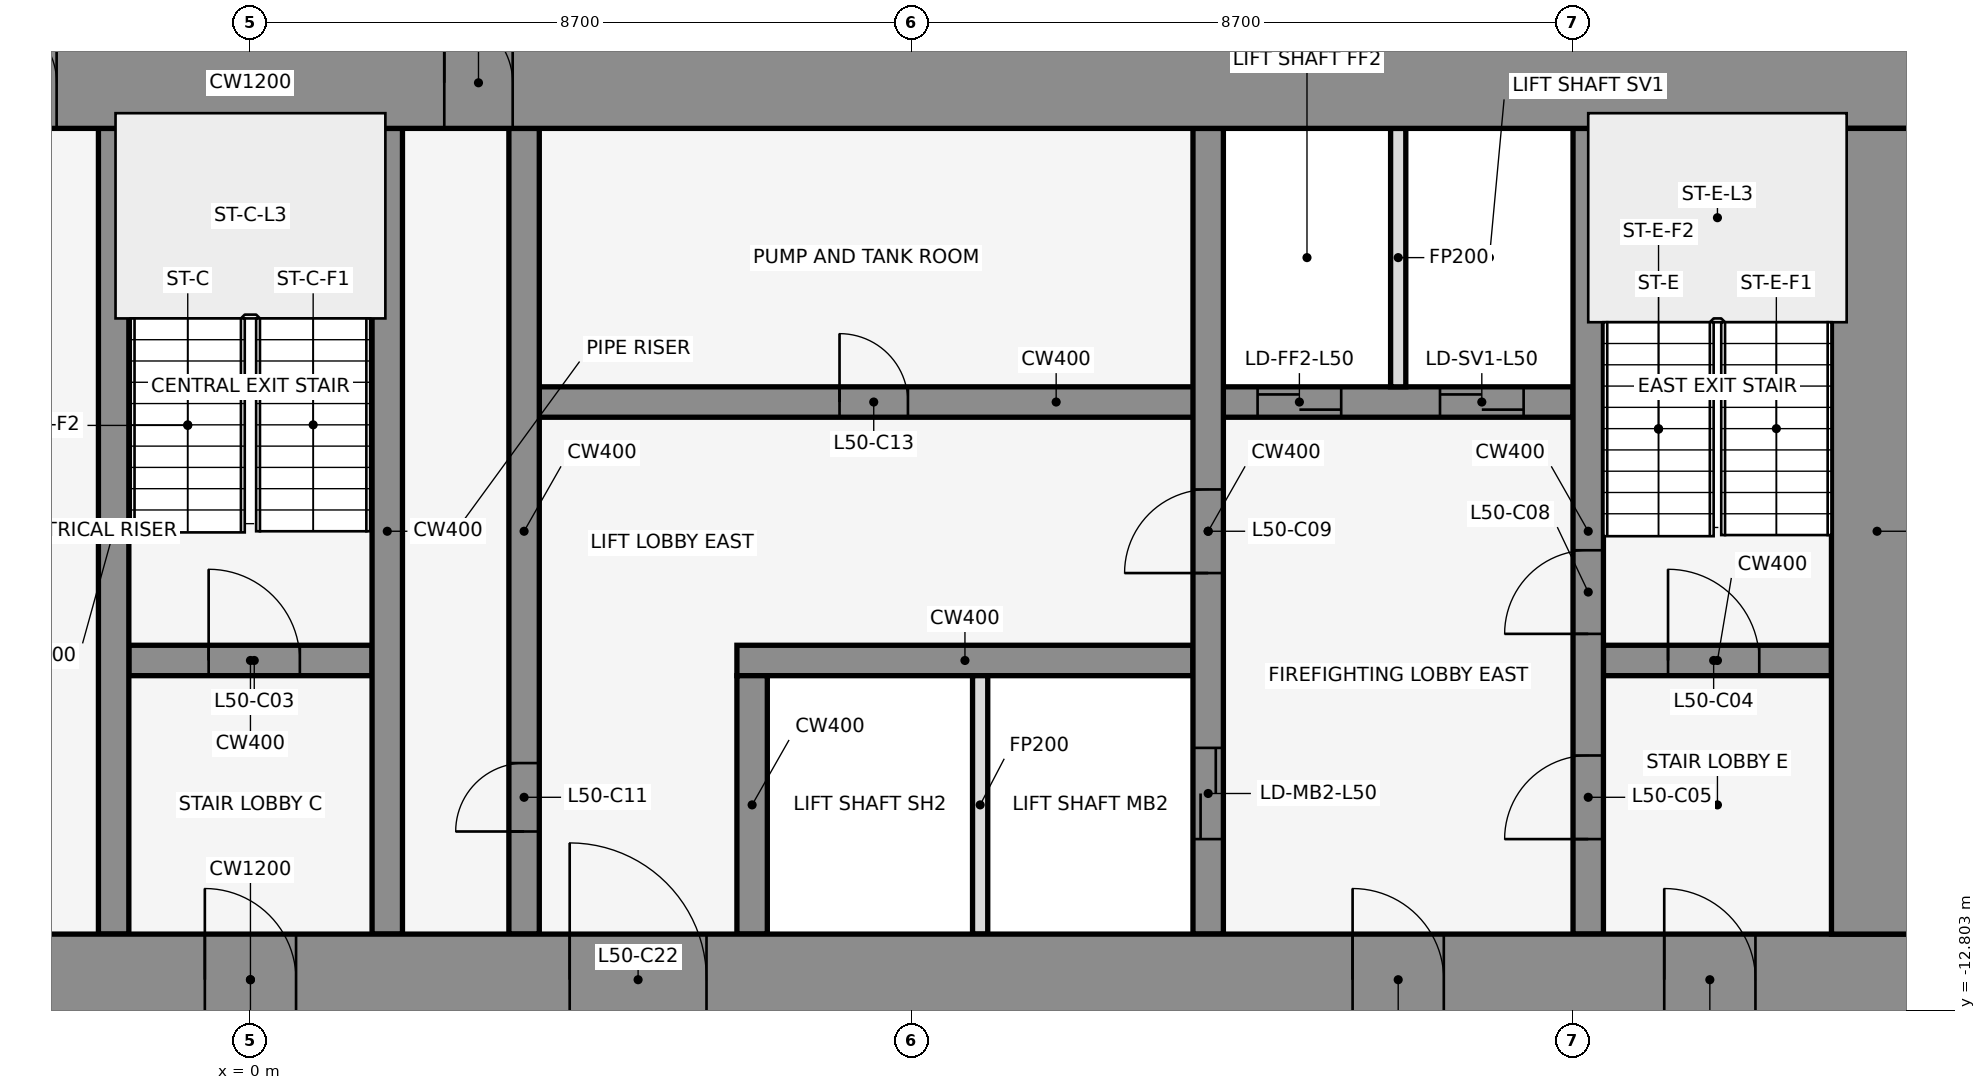
"""IFC4 building model, lengths in metres.
Left out: names, types, materials, properties, quantities, classifications, styles, units other than length and angle.
Written with IfcOpenShell. Run it as: python <this file> out.ifc"""

import sys

from ifc_helpers import new_model, si_unit, direction, frame, frame_2d, origin, place, context, subcontext, project, spatial, rectangle, extrude, element, fill, save


model = new_model("IFC4")
c1 = context("Model", 3, precision=1e-05, world=origin(), true_north=direction((0.0, 1.0)))
c2 = subcontext(c1, "Body", "Model", "MODEL_VIEW")
j1 = project(units=[si_unit("LENGTHUNIT", "METRE"), si_unit("PLANEANGLEUNIT", "RADIAN")], contexts=[c1])
p1 = place(None, origin())
s1 = spatial("IfcSite", under=j1, at=p1, CompositionType="ELEMENT")
p2 = place(p1, origin())
s2 = spatial("IfcBuilding", under=s1, at=p2, CompositionType="ELEMENT")
p3 = place(p2, frame((0.0, 0.0, 223.7)))
s3 = spatial("IfcBuildingStorey", under=s2, at=p3, CompositionType="ELEMENT", Elevation=223.7)
for number, where, z_axis, x_axis in (
    (1, (16.432, -0.105, 0.0), (0.0, 0.0, 1.0), (-0.84, 0.543, 0.0)),
    (2, (1.901, 1.08, 0.0), (0.0, 0.0, 1.0), (-0.84, -0.543, 0.0)),
    (3, (-0.068, -0.105, 0.0), (0.0, 0.0, 1.0), (-0.84, 0.543, 0.0)),
):
    element("IfcWall", number, at=place(p3, frame(where, z_axis=z_axis, x_axis=x_axis)), inside=s3, PredefinedType="STANDARD", context=c2, shape_type="SweptSolid", body=[
        extrude(rectangle(XDim=2.183, YDim=0.25, at=frame_2d((1.091, 0.0))), origin(), (0.0, 0.0, 1.0), 3.95),
    ])
p4 = place(p3, frame((-1.6, -8.2, 0.0), z_axis=(0.0, 0.0, 1.0), x_axis=(1.0, 0.0, 0.0)))
e4 = element("IfcWall", 4, at=p4, inside=s3, PredefinedType="SHEAR", context=c2, shape_type="SweptSolid", body=[
    extrude(rectangle(XDim=3.2, YDim=0.4, at=frame_2d((1.6, 0.0))), origin(), (0.0, 0.0, 1.0), 4.1),
])
p5 = place(p4, frame((1.05, 0.0, 0.0)))
e5 = element("IfcOpeningElement", 5, at=p5, cuts=e4, PredefinedType="OPENING", context=c2, shape_type="SweptSolid", body=[
    extrude(rectangle(XDim=1.2, YDim=2.1, at=frame_2d((0.6, 1.05))), frame((0.0, 0.212, 0.0), z_axis=(0.0, -1.0, 0.0), x_axis=(1.0, 0.0, 0.0)), (0.0, 0.0, 1.0), 0.424),
])
p6 = place(p3, frame((6.4, -8.2, 0.0), z_axis=(0.0, 0.0, 1.0), x_axis=(1.0, 0.0, 0.0)))
e6 = element("IfcWall", 6, at=p6, inside=s3, PredefinedType="SHEAR", context=c2, shape_type="SweptSolid", body=[
    extrude(rectangle(XDim=6.0, YDim=0.4, at=frame_2d((3.0, 0.0))), origin(), (0.0, 0.0, 1.0), 4.1),
])
p7 = place(p3, frame((17.8, -8.2, 0.0), z_axis=(0.0, 0.0, 1.0), x_axis=(1.0, 0.0, 0.0)))
e7 = element("IfcWall", 7, at=p7, inside=s3, PredefinedType="SHEAR", context=c2, shape_type="SweptSolid", body=[
    extrude(rectangle(XDim=3.0, YDim=0.4, at=frame_2d((1.5, 0.0))), origin(), (0.0, 0.0, 1.0), 4.1),
])
p8 = place(p7, frame((0.85, 0.0, 0.0)))
e8 = element("IfcOpeningElement", 8, at=p8, cuts=e7, PredefinedType="OPENING", context=c2, shape_type="SweptSolid", body=[
    extrude(rectangle(XDim=1.2, YDim=2.1, at=frame_2d((0.6, 1.05))), frame((0.0, 0.212, 0.0), z_axis=(0.0, -1.0, 0.0), x_axis=(1.0, 0.0, 0.0)), (0.0, 0.0, 1.0), 0.424),
])
p9 = place(p3, frame((3.8, -4.8, 0.0), z_axis=(0.0, 0.0, 1.0), x_axis=(1.0, 0.0, 0.0)))
e9 = element("IfcWall", 9, at=p9, inside=s3, PredefinedType="SHEAR", context=c2, shape_type="SweptSolid", body=[
    extrude(rectangle(XDim=13.6, YDim=0.4, at=frame_2d((6.8, 0.0))), origin(), (0.0, 0.0, 1.0), 4.1),
])
p10 = place(p9, frame((9.45, 0.0, 0.0)))
e10 = element("IfcOpeningElement", 10, at=p10, cuts=e9, PredefinedType="OPENING", context=c2, shape_type="SweptSolid", body=[
    extrude(rectangle(XDim=1.1, YDim=2.1, at=frame_2d((0.55, 1.05))), frame((0.0, 0.212, 0.0), z_axis=(0.0, -1.0, 0.0), x_axis=(1.0, 0.0, 0.0)), (0.0, 0.0, 1.0), 0.424),
])
p11 = place(p9, frame((11.85, 0.0, 0.0)))
e11 = element("IfcOpeningElement", 11, at=p11, cuts=e9, PredefinedType="OPENING", context=c2, shape_type="SweptSolid", body=[
    extrude(rectangle(XDim=1.1, YDim=2.1, at=frame_2d((0.55, 1.05))), frame((0.0, 0.212, 0.0), z_axis=(0.0, -1.0, 0.0), x_axis=(1.0, 0.0, 0.0)), (0.0, 0.0, 1.0), 0.424),
])
p12 = place(p9, frame((3.95, 0.0, 0.0)))
e12 = element("IfcOpeningElement", 12, at=p12, cuts=e9, PredefinedType="OPENING", context=c2, shape_type="SweptSolid", body=[
    extrude(rectangle(XDim=0.9, YDim=2.1, at=frame_2d((0.45, 1.05))), frame((0.0, 0.212, 0.0), z_axis=(0.0, -1.0, 0.0), x_axis=(1.0, 0.0, 0.0)), (0.0, 0.0, 1.0), 0.424),
])
for number, where, z_axis, x_axis in (
    (13, (-1.8, -11.8, 0.0), (0.0, 0.0, 1.0), (0.0, 1.0, 0.0)),
    (14, (1.8, -11.8, 0.0), (0.0, 0.0, 1.0), (0.0, 1.0, 0.0)),
):
    element("IfcWall", number, at=place(p3, frame(where, z_axis=z_axis, x_axis=x_axis)), inside=s3, PredefinedType="SHEAR", context=c2, shape_type="SweptSolid", body=[
        extrude(rectangle(XDim=10.6, YDim=0.4, at=frame_2d((5.3, 0.0))), origin(), (0.0, 0.0, 1.0), 4.1),
    ])
p13 = place(p3, frame((3.6, -11.8, 0.0), z_axis=(0.0, 0.0, 1.0), x_axis=(0.0, 1.0, 0.0)))
e15 = element("IfcWall", 15, at=p13, inside=s3, PredefinedType="SHEAR", context=c2, shape_type="SweptSolid", body=[
    extrude(rectangle(XDim=10.6, YDim=0.4, at=frame_2d((5.3, 0.0))), origin(), (0.0, 0.0, 1.0), 4.1),
])
p14 = place(p13, frame((1.35, 0.0, 0.0)))
e16 = element("IfcOpeningElement", 16, at=p14, cuts=e15, PredefinedType="OPENING", context=c2, shape_type="SweptSolid", body=[
    extrude(rectangle(XDim=0.9, YDim=2.1, at=frame_2d((0.45, 1.05))), frame((0.0, 0.212, 0.0), z_axis=(0.0, -1.0, 0.0), x_axis=(1.0, 0.0, 0.0)), (0.0, 0.0, 1.0), 0.424),
])
p15 = place(p3, frame((6.6, -11.8, 0.0), z_axis=(0.0, 0.0, 1.0), x_axis=(0.0, 1.0, 0.0)))
e17 = element("IfcWall", 17, at=p15, inside=s3, PredefinedType="SHEAR", context=c2, shape_type="SweptSolid", body=[
    extrude(rectangle(XDim=3.4, YDim=0.4, at=frame_2d((1.7, 0.0))), origin(), (0.0, 0.0, 1.0), 4.1),
])
p16 = place(p3, frame((9.6, -11.8, 0.0), z_axis=(0.0, 0.0, 1.0), x_axis=(0.0, 1.0, 0.0)))
e18 = element("IfcWall", 18, at=p16, inside=s3, PredefinedType="PARTITIONING", context=c2, shape_type="SweptSolid", body=[
    extrude(rectangle(XDim=3.4, YDim=0.2, at=frame_2d((1.7, 0.0))), origin(), (0.0, 0.0, 1.0), 2.84),
])
p17 = place(p3, frame((12.6, -11.8, 0.0), z_axis=(0.0, 0.0, 1.0), x_axis=(0.0, 1.0, 0.0)))
e19 = element("IfcWall", 19, at=p17, inside=s3, PredefinedType="SHEAR", context=c2, shape_type="SweptSolid", body=[
    extrude(rectangle(XDim=10.6, YDim=0.4, at=frame_2d((5.3, 0.0))), origin(), (0.0, 0.0, 1.0), 4.1),
])
p18 = place(p17, frame((1.25, 0.0, 0.0)))
e20 = element("IfcOpeningElement", 20, at=p18, cuts=e19, PredefinedType="OPENING", context=c2, shape_type="SweptSolid", body=[
    extrude(rectangle(XDim=1.2, YDim=2.1, at=frame_2d((0.6, 1.05))), frame((0.0, 0.212, 0.0), z_axis=(0.0, -1.0, 0.0), x_axis=(1.0, 0.0, 0.0)), (0.0, 0.0, 1.0), 0.424),
])
p19 = place(p17, frame((4.75, 0.0, 0.0)))
e21 = element("IfcOpeningElement", 21, at=p19, cuts=e19, PredefinedType="OPENING", context=c2, shape_type="SweptSolid", body=[
    extrude(rectangle(XDim=1.1, YDim=2.1, at=frame_2d((0.55, 1.05))), frame((0.0, 0.212, 0.0), z_axis=(0.0, -1.0, 0.0), x_axis=(1.0, 0.0, 0.0)), (0.0, 0.0, 1.0), 0.424),
])
p20 = place(p3, frame((15.1, -4.6, 0.0), z_axis=(0.0, 0.0, 1.0), x_axis=(0.0, 1.0, 0.0)))
e22 = element("IfcWall", 22, at=p20, inside=s3, PredefinedType="PARTITIONING", context=c2, shape_type="SweptSolid", body=[
    extrude(rectangle(XDim=3.4, YDim=0.2, at=frame_2d((1.7, 0.0))), origin(), (0.0, 0.0, 1.0), 2.84),
])
p21 = place(p3, frame((17.6, -11.8, 0.0), z_axis=(0.0, 0.0, 1.0), x_axis=(0.0, 1.0, 0.0)))
e23 = element("IfcWall", 23, at=p21, inside=s3, PredefinedType="SHEAR", context=c2, shape_type="SweptSolid", body=[
    extrude(rectangle(XDim=10.6, YDim=0.4, at=frame_2d((5.3, 0.0))), origin(), (0.0, 0.0, 1.0), 4.1),
])
p22 = place(p21, frame((1.25, 0.0, 0.0)))
e24 = element("IfcOpeningElement", 24, at=p22, cuts=e23, PredefinedType="OPENING", context=c2, shape_type="SweptSolid", body=[
    extrude(rectangle(XDim=1.1, YDim=2.1, at=frame_2d((0.55, 1.05))), frame((0.0, 0.212, 0.0), z_axis=(0.0, -1.0, 0.0), x_axis=(1.0, 0.0, 0.0)), (0.0, 0.0, 1.0), 0.424),
])
p23 = place(p21, frame((3.95, 0.0, 0.0)))
e25 = element("IfcOpeningElement", 25, at=p23, cuts=e23, PredefinedType="OPENING", context=c2, shape_type="SweptSolid", body=[
    extrude(rectangle(XDim=1.1, YDim=2.1, at=frame_2d((0.55, 1.05))), frame((0.0, 0.212, 0.0), z_axis=(0.0, -1.0, 0.0), x_axis=(1.0, 0.0, 0.0)), (0.0, 0.0, 1.0), 0.424),
])
p24 = place(p3, frame((-22.0, -0.6, 0.0), z_axis=(0.0, 0.0, 1.0), x_axis=(1.0, 0.0, 0.0)))
e26 = element("IfcWall", 26, at=p24, inside=s3, PredefinedType="SHEAR", context=c2, shape_type="SweptSolid", body=[
    extrude(rectangle(XDim=44.0, YDim=1.2, at=frame_2d((22.0, 0.0))), origin(), (0.0, 0.0, 1.0), 4.1),
])
p25 = place(p24, frame((18.55, 0.0, 0.0)))
e27 = element("IfcOpeningElement", 27, at=p25, cuts=e26, PredefinedType="OPENING", context=c2, shape_type="SweptSolid", body=[
    extrude(rectangle(XDim=0.9, YDim=2.1, at=frame_2d((0.45, 1.05))), frame((0.0, 0.612, 0.0), z_axis=(0.0, -1.0, 0.0), x_axis=(1.0, 0.0, 0.0)), (0.0, 0.0, 1.0), 1.224),
])
p26 = place(p24, frame((24.55, 0.0, 0.0)))
e28 = element("IfcOpeningElement", 28, at=p26, cuts=e26, PredefinedType="OPENING", context=c2, shape_type="SweptSolid", body=[
    extrude(rectangle(XDim=0.9, YDim=2.1, at=frame_2d((0.45, 1.05))), frame((0.0, 0.612, 0.0), z_axis=(0.0, -1.0, 0.0), x_axis=(1.0, 0.0, 0.0)), (0.0, 0.0, 1.0), 1.224),
])
p27 = place(p3, frame((-22.0, -12.4, 0.0), z_axis=(0.0, 0.0, 1.0), x_axis=(1.0, 0.0, 0.0)))
e29 = element("IfcWall", 29, at=p27, inside=s3, PredefinedType="SHEAR", context=c2, shape_type="SweptSolid", body=[
    extrude(rectangle(XDim=44.0, YDim=1.2, at=frame_2d((22.0, 0.0))), origin(), (0.0, 0.0, 1.0), 4.1),
])
p28 = place(p27, frame((2.2, 0.0, 0.0)))
e30 = element("IfcOpeningElement", 30, at=p28, cuts=e29, PredefinedType="OPENING", context=c2, shape_type="SweptSolid", body=[
    extrude(rectangle(XDim=1.2, YDim=2.1, at=frame_2d((0.6, 1.05))), frame((0.0, 0.612, 0.0), z_axis=(0.0, -1.0, 0.0), x_axis=(1.0, 0.0, 0.0)), (0.0, 0.0, 1.0), 1.224),
])
p29 = place(p27, frame((21.4, 0.0, 0.0)))
e31 = element("IfcOpeningElement", 31, at=p29, cuts=e29, PredefinedType="OPENING", context=c2, shape_type="SweptSolid", body=[
    extrude(rectangle(XDim=1.2, YDim=2.1, at=frame_2d((0.6, 1.05))), frame((0.0, 0.612, 0.0), z_axis=(0.0, -1.0, 0.0), x_axis=(1.0, 0.0, 0.0)), (0.0, 0.0, 1.0), 1.224),
])
p30 = place(p27, frame((40.6, 0.0, 0.0)))
e32 = element("IfcOpeningElement", 32, at=p30, cuts=e29, PredefinedType="OPENING", context=c2, shape_type="SweptSolid", body=[
    extrude(rectangle(XDim=1.2, YDim=2.1, at=frame_2d((0.6, 1.05))), frame((0.0, 0.612, 0.0), z_axis=(0.0, -1.0, 0.0), x_axis=(1.0, 0.0, 0.0)), (0.0, 0.0, 1.0), 1.224),
])
p31 = place(p27, frame((16.0, 0.0, 0.0)))
e33 = element("IfcOpeningElement", 33, at=p31, cuts=e29, PredefinedType="OPENING", context=c2, shape_type="SweptSolid", body=[
    extrude(rectangle(XDim=1.8, YDim=2.1, at=frame_2d((0.9, 1.05))), frame((0.0, 0.612, 0.0), z_axis=(0.0, -1.0, 0.0), x_axis=(1.0, 0.0, 0.0)), (0.0, 0.0, 1.0), 1.224),
])
p32 = place(p27, frame((6.3, 0.0, 0.0)))
e34 = element("IfcOpeningElement", 34, at=p32, cuts=e29, PredefinedType="OPENING", context=c2, shape_type="SweptSolid", body=[
    extrude(rectangle(XDim=1.2, YDim=2.1, at=frame_2d((0.6, 1.05))), frame((0.0, 0.612, 0.0), z_axis=(0.0, -1.0, 0.0), x_axis=(1.0, 0.0, 0.0)), (0.0, 0.0, 1.0), 1.224),
])
p33 = place(p27, frame((26.2, 0.0, 0.0)))
e35 = element("IfcOpeningElement", 35, at=p33, cuts=e29, PredefinedType="OPENING", context=c2, shape_type="SweptSolid", body=[
    extrude(rectangle(XDim=1.8, YDim=2.1, at=frame_2d((0.9, 1.05))), frame((0.0, 0.612, 0.0), z_axis=(0.0, -1.0, 0.0), x_axis=(1.0, 0.0, 0.0)), (0.0, 0.0, 1.0), 1.224),
])
p34 = place(p27, frame((36.5, 0.0, 0.0)))
e36 = element("IfcOpeningElement", 36, at=p34, cuts=e29, PredefinedType="OPENING", context=c2, shape_type="SweptSolid", body=[
    extrude(rectangle(XDim=1.2, YDim=2.1, at=frame_2d((0.6, 1.05))), frame((0.0, 0.612, 0.0), z_axis=(0.0, -1.0, 0.0), x_axis=(1.0, 0.0, 0.0)), (0.0, 0.0, 1.0), 1.224),
])
p35 = place(p3, frame((21.4, -11.8, 0.0), z_axis=(0.0, 0.0, 1.0), x_axis=(0.0, 1.0, 0.0)))
e37 = element("IfcWall", 37, at=p35, inside=s3, PredefinedType="SHEAR", context=c2, shape_type="SweptSolid", body=[
    extrude(rectangle(XDim=10.6, YDim=1.2, at=frame_2d((5.3, 0.0))), origin(), (0.0, 0.0, 1.0), 4.1),
])
p36 = place(p5, origin())
e38 = element("IfcDoor", 38, at=p36, inside=s3, OperationType="SINGLE_SWING_LEFT", PredefinedType="DOOR", context=c2, shape_type="SweptSolid", body=[
    extrude(rectangle(XDim=1.2, YDim=2.1, at=frame_2d((0.6, 1.05))), frame((0.0, 0.025, 0.0), z_axis=(0.0, -1.0, 0.0), x_axis=(1.0, 0.0, 0.0)), (0.0, 0.0, 1.0), 0.05),
])
fill(e5, e38)
p37 = place(p8, origin())
e39 = element("IfcDoor", 39, at=p37, inside=s3, OperationType="SINGLE_SWING_RIGHT", PredefinedType="DOOR", context=c2, shape_type="SweptSolid", body=[
    extrude(rectangle(XDim=1.2, YDim=2.1, at=frame_2d((0.6, 1.05))), frame((0.0, 0.025, 0.0), z_axis=(0.0, -1.0, 0.0), x_axis=(1.0, 0.0, 0.0)), (0.0, 0.0, 1.0), 0.05),
])
fill(e8, e39)
p38 = place(p22, origin())
e40 = element("IfcDoor", 40, at=p38, inside=s3, OperationType="SINGLE_SWING_LEFT", PredefinedType="DOOR", context=c2, shape_type="SweptSolid", body=[
    extrude(rectangle(XDim=1.1, YDim=2.1, at=frame_2d((0.55, 1.05))), frame((0.0, 0.025, 0.0), z_axis=(0.0, -1.0, 0.0), x_axis=(1.0, 0.0, 0.0)), (0.0, 0.0, 1.0), 0.05),
])
fill(e24, e40)
p39 = place(p18, origin())
e41 = element("IfcDoor", 41, at=p39, inside=s3, OperationType="DOUBLE_DOOR_SLIDING", PredefinedType="DOOR", context=c2, shape_type="SweptSolid", body=[
    extrude(rectangle(XDim=1.2, YDim=2.1, at=frame_2d((0.6, 1.05))), frame((0.0, 0.025, 0.0), z_axis=(0.0, -1.0, 0.0), x_axis=(1.0, 0.0, 0.0)), (0.0, 0.0, 1.0), 0.05),
])
fill(e20, e41)
p40 = place(p10, origin())
e42 = element("IfcDoor", 42, at=p40, inside=s3, OperationType="DOUBLE_DOOR_SLIDING", PredefinedType="DOOR", context=c2, shape_type="SweptSolid", body=[
    extrude(rectangle(XDim=1.1, YDim=2.1, at=frame_2d((0.55, 1.05))), frame((0.0, 0.025, 0.0), z_axis=(0.0, -1.0, 0.0), x_axis=(1.0, 0.0, 0.0)), (0.0, 0.0, 1.0), 0.05),
])
fill(e10, e42)
p41 = place(p11, origin())
e43 = element("IfcDoor", 43, at=p41, inside=s3, OperationType="DOUBLE_DOOR_SLIDING", PredefinedType="DOOR", context=c2, shape_type="SweptSolid", body=[
    extrude(rectangle(XDim=1.1, YDim=2.1, at=frame_2d((0.55, 1.05))), frame((0.0, 0.025, 0.0), z_axis=(0.0, -1.0, 0.0), x_axis=(1.0, 0.0, 0.0)), (0.0, 0.0, 1.0), 0.05),
])
fill(e11, e43)
p42 = place(p23, origin())
e44 = element("IfcDoor", 44, at=p42, inside=s3, OperationType="SINGLE_SWING_RIGHT", PredefinedType="DOOR", context=c2, shape_type="SweptSolid", body=[
    extrude(rectangle(XDim=1.1, YDim=2.1, at=frame_2d((0.55, 1.05))), frame((0.0, 0.025, 0.0), z_axis=(0.0, -1.0, 0.0), x_axis=(1.0, 0.0, 0.0)), (0.0, 0.0, 1.0), 0.05),
])
fill(e25, e44)
p43 = place(p19, frame((1.1, 0.0, 0.0), z_axis=(0.0, 0.0, 1.0), x_axis=(-1.0, 0.0, 0.0)))
e45 = element("IfcDoor", 45, at=p43, inside=s3, OperationType="SINGLE_SWING_RIGHT", PredefinedType="DOOR", context=c2, shape_type="SweptSolid", body=[
    extrude(rectangle(XDim=1.1, YDim=2.1, at=frame_2d((0.55, 1.05))), frame((0.0, 0.025, 0.0), z_axis=(0.0, -1.0, 0.0), x_axis=(1.0, 0.0, 0.0)), (0.0, 0.0, 1.0), 0.05),
])
fill(e21, e45)
p44 = place(p14, origin())
e46 = element("IfcDoor", 46, at=p44, inside=s3, OperationType="SINGLE_SWING_LEFT", PredefinedType="DOOR", context=c2, shape_type="SweptSolid", body=[
    extrude(rectangle(XDim=0.9, YDim=2.1, at=frame_2d((0.45, 1.05))), frame((0.0, 0.025, 0.0), z_axis=(0.0, -1.0, 0.0), x_axis=(1.0, 0.0, 0.0)), (0.0, 0.0, 1.0), 0.05),
])
fill(e16, e46)
p45 = place(p12, origin())
e47 = element("IfcDoor", 47, at=p45, inside=s3, OperationType="SINGLE_SWING_LEFT", PredefinedType="DOOR", context=c2, shape_type="SweptSolid", body=[
    extrude(rectangle(XDim=0.9, YDim=2.1, at=frame_2d((0.45, 1.05))), frame((0.0, 0.025, 0.0), z_axis=(0.0, -1.0, 0.0), x_axis=(1.0, 0.0, 0.0)), (0.0, 0.0, 1.0), 0.05),
])
fill(e12, e47)
p46 = place(p25, origin())
e48 = element("IfcDoor", 48, at=p46, inside=s3, OperationType="SINGLE_SWING_LEFT", PredefinedType="DOOR", context=c2, shape_type="SweptSolid", body=[
    extrude(rectangle(XDim=0.9, YDim=2.1, at=frame_2d((0.45, 1.05))), frame((0.0, 0.025, 0.0), z_axis=(0.0, -1.0, 0.0), x_axis=(1.0, 0.0, 0.0)), (0.0, 0.0, 1.0), 0.05),
])
fill(e27, e48)
p47 = place(p26, origin())
e49 = element("IfcDoor", 49, at=p47, inside=s3, OperationType="SINGLE_SWING_LEFT", PredefinedType="DOOR", context=c2, shape_type="SweptSolid", body=[
    extrude(rectangle(XDim=0.9, YDim=2.1, at=frame_2d((0.45, 1.05))), frame((0.0, 0.025, 0.0), z_axis=(0.0, -1.0, 0.0), x_axis=(1.0, 0.0, 0.0)), (0.0, 0.0, 1.0), 0.05),
])
fill(e28, e49)
p48 = place(p29, frame((1.2, 0.0, 0.0), z_axis=(0.0, 0.0, 1.0), x_axis=(-1.0, 0.0, 0.0)))
e50 = element("IfcDoor", 50, at=p48, inside=s3, OperationType="SINGLE_SWING_RIGHT", PredefinedType="DOOR", context=c2, shape_type="SweptSolid", body=[
    extrude(rectangle(XDim=1.2, YDim=2.1, at=frame_2d((0.6, 1.05))), frame((0.0, 0.025, 0.0), z_axis=(0.0, -1.0, 0.0), x_axis=(1.0, 0.0, 0.0)), (0.0, 0.0, 1.0), 0.05),
])
fill(e31, e50)
p49 = place(p30, frame((1.2, 0.0, 0.0), z_axis=(0.0, 0.0, 1.0), x_axis=(-1.0, 0.0, 0.0)))
e51 = element("IfcDoor", 51, at=p49, inside=s3, OperationType="SINGLE_SWING_RIGHT", PredefinedType="DOOR", context=c2, shape_type="SweptSolid", body=[
    extrude(rectangle(XDim=1.2, YDim=2.1, at=frame_2d((0.6, 1.05))), frame((0.0, 0.025, 0.0), z_axis=(0.0, -1.0, 0.0), x_axis=(1.0, 0.0, 0.0)), (0.0, 0.0, 1.0), 0.05),
])
fill(e32, e51)
p50 = place(p33, origin())
e52 = element("IfcDoor", 52, at=p50, inside=s3, OperationType="SINGLE_SWING_LEFT", PredefinedType="DOOR", context=c2, shape_type="SweptSolid", body=[
    extrude(rectangle(XDim=1.8, YDim=2.1, at=frame_2d((0.9, 1.05))), frame((0.0, 0.025, 0.0), z_axis=(0.0, -1.0, 0.0), x_axis=(1.0, 0.0, 0.0)), (0.0, 0.0, 1.0), 0.05),
])
fill(e35, e52)
p51 = place(p34, frame((1.2, 0.0, 0.0), z_axis=(0.0, 0.0, 1.0), x_axis=(-1.0, 0.0, 0.0)))
e53 = element("IfcDoor", 53, at=p51, inside=s3, OperationType="SINGLE_SWING_RIGHT", PredefinedType="DOOR", context=c2, shape_type="SweptSolid", body=[
    extrude(rectangle(XDim=1.2, YDim=2.1, at=frame_2d((0.6, 1.05))), frame((0.0, 0.025, 0.0), z_axis=(0.0, -1.0, 0.0), x_axis=(1.0, 0.0, 0.0)), (0.0, 0.0, 1.0), 0.05),
])
fill(e36, e53)
save(model, sys.argv[1])
